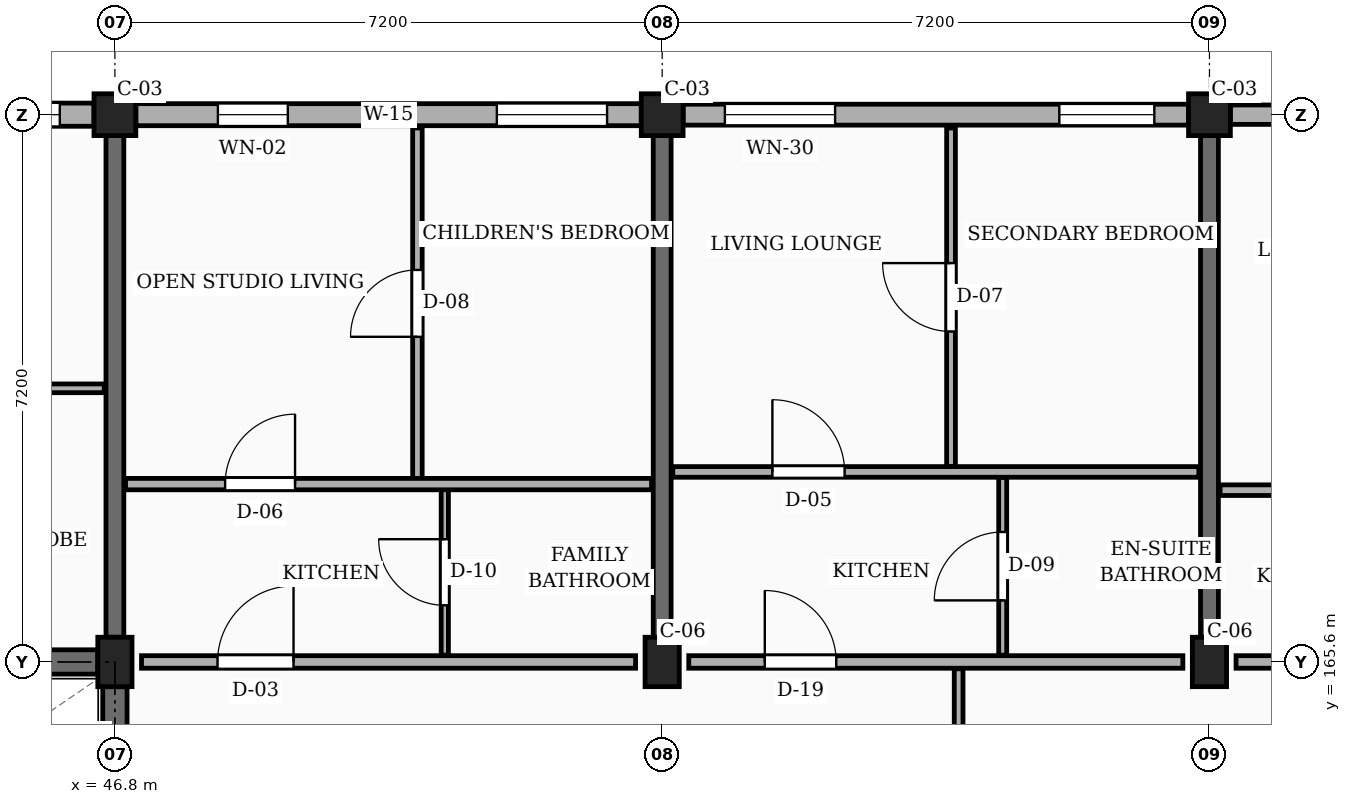
"""IFC4 building model, lengths in metres.
Left out: names, types, materials, properties, quantities, classifications, styles, units other than length and angle.
Written with IfcOpenShell. Run it as: python <this file> out.ifc"""

import sys

from ifc_helpers import new_model, si_unit, direction, frame, frame_2d, origin, origin_2d, place, context, subcontext, project, spatial, rectangle, extrude, element, fill, save


model = new_model("IFC4")
c1 = context("Model", 3, precision=1e-05, world=origin(), true_north=direction((0.0, 1.0)))
c2 = subcontext(c1, "Body", "Model", "MODEL_VIEW")
j1 = project(units=[si_unit("LENGTHUNIT", "METRE"), si_unit("PLANEANGLEUNIT", "RADIAN")], contexts=[c1])
p1 = place(None, origin())
s1 = spatial("IfcSite", under=j1, at=p1, CompositionType="ELEMENT")
p2 = place(p1, origin())
s2 = spatial("IfcBuilding", under=s1, at=p2, CompositionType="ELEMENT")
p3 = place(p2, frame((0.0, 0.0, 17.1)))
s3 = spatial("IfcBuildingStorey", under=s2, at=p3, CompositionType="ELEMENT", Elevation=17.1)
p4 = place(p3, frame((46.8, 165.6, 0.0), z_axis=(0.0, 0.0, 1.0), x_axis=(1.0, 0.0, 0.0)))
e1 = element("IfcColumn", 1, at=p4, inside=s3, PredefinedType="COLUMN", context=c2, shape_type="SweptSolid", body=[
    extrude(rectangle(XDim=0.45, YDim=0.65, at=origin_2d()), origin(), (0.0, 0.0, 1.0), 3.15),
])
p5 = place(p3, frame((46.8, 172.8, 0.0), z_axis=(0.0, 0.0, 1.0), x_axis=(1.0, 0.0, 0.0)))
e2 = element("IfcColumn", 2, at=p5, inside=s3, PredefinedType="COLUMN", context=c2, shape_type="SweptSolid", body=[
    extrude(rectangle(XDim=0.55, YDim=0.55, at=origin_2d()), origin(), (0.0, 0.0, 1.0), 3.15),
])
p6 = place(p3, frame((54.0, 165.6, 0.0), z_axis=(0.0, 0.0, 1.0), x_axis=(1.0, 0.0, 0.0)))
e3 = element("IfcColumn", 3, at=p6, inside=s3, PredefinedType="COLUMN", context=c2, shape_type="SweptSolid", body=[
    extrude(rectangle(XDim=0.45, YDim=0.65, at=origin_2d()), origin(), (0.0, 0.0, 1.0), 3.15),
])
p7 = place(p3, frame((54.0, 172.8, 0.0), z_axis=(0.0, 0.0, 1.0), x_axis=(1.0, 0.0, 0.0)))
e4 = element("IfcColumn", 4, at=p7, inside=s3, PredefinedType="COLUMN", context=c2, shape_type="SweptSolid", body=[
    extrude(rectangle(XDim=0.55, YDim=0.55, at=origin_2d()), origin(), (0.0, 0.0, 1.0), 3.15),
])
p8 = place(p3, frame((61.2, 165.6, 0.0), z_axis=(0.0, 0.0, 1.0), x_axis=(1.0, 0.0, 0.0)))
e5 = element("IfcColumn", 5, at=p8, inside=s3, PredefinedType="COLUMN", context=c2, shape_type="SweptSolid", body=[
    extrude(rectangle(XDim=0.45, YDim=0.65, at=origin_2d()), origin(), (0.0, 0.0, 1.0), 3.15),
])
p9 = place(p3, frame((61.2, 172.8, 0.0), z_axis=(0.0, 0.0, 1.0), x_axis=(1.0, 0.0, 0.0)))
e6 = element("IfcColumn", 6, at=p9, inside=s3, PredefinedType="COLUMN", context=c2, shape_type="SweptSolid", body=[
    extrude(rectangle(XDim=0.55, YDim=0.55, at=origin_2d()), origin(), (0.0, 0.0, 1.0), 3.15),
])
for number, where, z_axis, x_axis in (
    (7, (46.8, 165.925, 0.0), (0.0, 0.0, 1.0), (0.0, 1.0, 0.0)),
    (8, (54.0, 165.925, 0.0), (0.0, 0.0, 1.0), (0.0, 1.0, 0.0)),
    (9, (61.2, 165.925, 0.0), (0.0, 0.0, 1.0), (0.0, 1.0, 0.0)),
):
    element("IfcWall", number, at=place(p3, frame(where, z_axis=z_axis, x_axis=x_axis)), inside=s3, PredefinedType="SOLIDWALL", context=c2, shape_type="SweptSolid", body=[
        extrude(rectangle(XDim=6.6, YDim=0.235, at=frame_2d((3.3, 0.0))), origin(), (0.0, 0.0, 1.0), 2.185),
    ])
p10 = place(p3, frame((68.125, 172.8, 0.0), z_axis=(0.0, 0.0, 1.0), x_axis=(-1.0, 0.0, 0.0)))
e10 = element("IfcWall", 10, at=p10, inside=s3, PredefinedType="SOLIDWALL", context=c2, shape_type="SweptSolid", body=[
    extrude(rectangle(XDim=6.65, YDim=0.255, at=frame_2d((3.325, 0.0))), origin(), (0.0, 0.0, 1.0), 2.455),
])
p11 = place(p10, frame((0.45, 0.0, 0.78)))
e11 = element("IfcOpeningElement", 11, at=p11, cuts=e10, PredefinedType="OPENING", context=c2, shape_type="SweptSolid", body=[
    extrude(rectangle(XDim=1.05, YDim=1.44, at=frame_2d((0.525, 0.72))), frame((0.0, 0.137, 0.0), z_axis=(0.0, -1.0, 0.0), x_axis=(1.0, 0.0, 0.0)), (0.0, 0.0, 1.0), 0.275),
])
p12 = place(p10, frame((4.65, 0.0, 0.78)))
e12 = element("IfcOpeningElement", 12, at=p12, cuts=e10, PredefinedType="OPENING", context=c2, shape_type="SweptSolid", body=[
    extrude(rectangle(XDim=1.25, YDim=1.44, at=frame_2d((0.625, 0.72))), frame((0.0, 0.137, 0.0), z_axis=(0.0, -1.0, 0.0), x_axis=(1.0, 0.0, 0.0)), (0.0, 0.0, 1.0), 0.275),
])
p13 = place(p3, frame((60.925, 172.8, 0.0), z_axis=(0.0, 0.0, 1.0), x_axis=(-1.0, 0.0, 0.0)))
e13 = element("IfcWall", 13, at=p13, inside=s3, PredefinedType="SOLIDWALL", context=c2, shape_type="SweptSolid", body=[
    extrude(rectangle(XDim=6.65, YDim=0.275, at=frame_2d((3.325, 0.0))), origin(), (0.0, 0.0, 1.0), 2.455),
])
p14 = place(p13, frame((0.45, 0.0, 0.78)))
e14 = element("IfcOpeningElement", 14, at=p14, cuts=e13, PredefinedType="OPENING", context=c2, shape_type="SweptSolid", body=[
    extrude(rectangle(XDim=1.25, YDim=1.44, at=frame_2d((0.625, 0.72))), frame((0.0, 0.147, 0.0), z_axis=(0.0, -1.0, 0.0), x_axis=(1.0, 0.0, 0.0)), (0.0, 0.0, 1.0), 0.295),
])
p15 = place(p13, frame((4.65, 0.0, 0.78)))
e15 = element("IfcOpeningElement", 15, at=p15, cuts=e13, PredefinedType="OPENING", context=c2, shape_type="SweptSolid", body=[
    extrude(rectangle(XDim=1.45, YDim=1.44, at=frame_2d((0.725, 0.72))), frame((0.0, 0.147, 0.0), z_axis=(0.0, -1.0, 0.0), x_axis=(1.0, 0.0, 0.0)), (0.0, 0.0, 1.0), 0.295),
])
p16 = place(p3, frame((53.725, 172.8, 0.0), z_axis=(0.0, 0.0, 1.0), x_axis=(-1.0, 0.0, 0.0)))
e16 = element("IfcWall", 16, at=p16, inside=s3, PredefinedType="SOLIDWALL", context=c2, shape_type="SweptSolid", body=[
    extrude(rectangle(XDim=6.65, YDim=0.29, at=frame_2d((3.325, 0.0))), origin(), (0.0, 0.0, 1.0), 2.455),
])
p17 = place(p16, frame((0.45, 0.0, 0.78)))
e17 = element("IfcOpeningElement", 17, at=p17, cuts=e16, PredefinedType="OPENING", context=c2, shape_type="SweptSolid", body=[
    extrude(rectangle(XDim=1.45, YDim=1.44, at=frame_2d((0.725, 0.72))), frame((0.0, 0.155, 0.0), z_axis=(0.0, -1.0, 0.0), x_axis=(1.0, 0.0, 0.0)), (0.0, 0.0, 1.0), 0.31),
])
p18 = place(p16, frame((4.65, 0.0, 0.78)))
e18 = element("IfcOpeningElement", 18, at=p18, cuts=e16, PredefinedType="OPENING", context=c2, shape_type="SweptSolid", body=[
    extrude(rectangle(XDim=0.92, YDim=1.15, at=frame_2d((0.46, 0.575))), frame((0.0, 0.155, 0.0), z_axis=(0.0, -1.0, 0.0), x_axis=(1.0, 0.0, 0.0)), (0.0, 0.0, 1.0), 0.31),
])
p19 = place(p3, frame((46.525, 172.8, 0.0), z_axis=(0.0, 0.0, 1.0), x_axis=(-1.0, 0.0, 0.0)))
e19 = element("IfcWall", 19, at=p19, inside=s3, PredefinedType="SOLIDWALL", context=c2, shape_type="SweptSolid", body=[
    extrude(rectangle(XDim=6.65, YDim=0.305, at=frame_2d((3.325, 0.0))), origin(), (0.0, 0.0, 1.0), 2.455),
])
p20 = place(p19, frame((0.45, 0.0, 0.78)))
e20 = element("IfcOpeningElement", 20, at=p20, cuts=e19, PredefinedType="OPENING", context=c2, shape_type="SweptSolid", body=[
    extrude(rectangle(XDim=0.92, YDim=1.15, at=frame_2d((0.46, 0.575))), frame((0.0, 0.163, 0.0), z_axis=(0.0, -1.0, 0.0), x_axis=(1.0, 0.0, 0.0)), (0.0, 0.0, 1.0), 0.325),
])
p21 = place(p19, frame((4.65, 0.0, 0.78)))
e21 = element("IfcOpeningElement", 21, at=p21, cuts=e19, PredefinedType="OPENING", context=c2, shape_type="SweptSolid", body=[
    extrude(rectangle(XDim=1.08, YDim=1.15, at=frame_2d((0.54, 0.575))), frame((0.0, 0.163, 0.0), z_axis=(0.0, -1.0, 0.0), x_axis=(1.0, 0.0, 0.0)), (0.0, 0.0, 1.0), 0.325),
])
p22 = place(p3, frame((39.825, 165.6, 0.0), z_axis=(0.0, 0.0, 1.0), x_axis=(1.0, 0.0, 0.0)))
e22 = element("IfcWall", 22, at=p22, inside=s3, PredefinedType="SHEAR", context=c2, shape_type="SweptSolid", body=[
    extrude(rectangle(XDim=6.75, YDim=0.32, at=frame_2d((3.375, 0.0))), origin(), (0.0, 0.0, 1.0), 2.885),
])
p23 = place(p3, frame((46.8, 158.725, 0.0), z_axis=(0.0, 0.0, 1.0), x_axis=(0.0, 1.0, 0.0)))
e23 = element("IfcWall", 23, at=p23, inside=s3, PredefinedType="SHEAR", context=c2, shape_type="SweptSolid", body=[
    extrude(rectangle(XDim=6.55, YDim=0.32, at=frame_2d((3.275, 0.0))), origin(), (0.0, 0.0, 1.0), 2.885),
])
p24 = place(p3, frame((47.15, 165.6, 0.0), z_axis=(0.0, 0.0, 1.0), x_axis=(1.0, 0.0, 0.0)))
e24 = element("IfcWall", 24, at=p24, inside=s3, PredefinedType="PARTITIONING", context=c2, shape_type="SweptSolid", body=[
    extrude(rectangle(XDim=6.5, YDim=0.165, at=frame_2d((3.25, 0.0))), origin(), (0.0, 0.0, 1.0), 2.235),
])
p25 = place(p24, frame((1.0, 0.0, 0.0)))
e25 = element("IfcOpeningElement", 25, at=p25, cuts=e24, PredefinedType="OPENING", context=c2, shape_type="SweptSolid", body=[
    extrude(rectangle(XDim=1.0, YDim=2.15, at=frame_2d((0.5, 1.075))), frame((0.0, 0.093, 0.0), z_axis=(0.0, -1.0, 0.0), x_axis=(1.0, 0.0, 0.0)), (0.0, 0.0, 1.0), 0.185),
])
p26 = place(p3, frame((54.35, 165.6, 0.0), z_axis=(0.0, 0.0, 1.0), x_axis=(1.0, 0.0, 0.0)))
e26 = element("IfcWall", 26, at=p26, inside=s3, PredefinedType="PARTITIONING", context=c2, shape_type="SweptSolid", body=[
    extrude(rectangle(XDim=6.5, YDim=0.165, at=frame_2d((3.25, 0.0))), origin(), (0.0, 0.0, 1.0), 2.235),
])
p27 = place(p26, frame((1.0, 0.0, 0.0)))
e27 = element("IfcOpeningElement", 27, at=p27, cuts=e26, PredefinedType="OPENING", context=c2, shape_type="SweptSolid", body=[
    extrude(rectangle(XDim=0.94, YDim=2.12, at=frame_2d((0.47, 1.06))), frame((0.0, 0.093, 0.0), z_axis=(0.0, -1.0, 0.0), x_axis=(1.0, 0.0, 0.0)), (0.0, 0.0, 1.0), 0.185),
])
p28 = place(p3, frame((61.55, 165.6, 0.0), z_axis=(0.0, 0.0, 1.0), x_axis=(1.0, 0.0, 0.0)))
e28 = element("IfcWall", 28, at=p28, inside=s3, PredefinedType="PARTITIONING", context=c2, shape_type="SweptSolid", body=[
    extrude(rectangle(XDim=6.5, YDim=0.165, at=frame_2d((3.25, 0.0))), origin(), (0.0, 0.0, 1.0), 2.235),
])
p29 = place(p28, frame((1.0, 0.0, 0.0)))
e29 = element("IfcOpeningElement", 29, at=p29, cuts=e28, PredefinedType="OPENING", context=c2, shape_type="SweptSolid", body=[
    extrude(rectangle(XDim=1.14, YDim=2.18, at=frame_2d((0.57, 1.09))), frame((0.0, 0.093, 0.0), z_axis=(0.0, -1.0, 0.0), x_axis=(1.0, 0.0, 0.0)), (0.0, 0.0, 1.0), 0.185),
])
p30 = place(p3, frame((39.74, 169.2, 0.0), z_axis=(0.0, 0.0, 1.0), x_axis=(1.0, 0.0, 0.0)))
e30 = element("IfcWall", 30, at=p30, inside=s3, PredefinedType="PARTITIONING", context=c2, shape_type="SweptSolid", body=[
    extrude(rectangle(XDim=6.92, YDim=0.115, at=frame_2d((3.46, 0.0))), origin(), (0.0, 0.0, 1.0), 2.32),
])
p31 = place(p30, frame((1.05, 0.0, 0.0)))
e31 = element("IfcOpeningElement", 31, at=p31, cuts=e30, PredefinedType="OPENING", context=c2, shape_type="SweptSolid", body=[
    extrude(rectangle(XDim=0.87, YDim=2.05, at=frame_2d((0.435, 1.025))), frame((0.0, 0.067, 0.0), z_axis=(0.0, -1.0, 0.0), x_axis=(1.0, 0.0, 0.0)), (0.0, 0.0, 1.0), 0.135),
])
p32 = place(p30, frame((4.45, 0.0, 0.0)))
e32 = element("IfcOpeningElement", 32, at=p32, cuts=e30, PredefinedType="OPENING", context=c2, shape_type="SweptSolid", body=[
    extrude(rectangle(XDim=0.88, YDim=2.08, at=frame_2d((0.44, 1.04))), frame((0.0, 0.067, 0.0), z_axis=(0.0, -1.0, 0.0), x_axis=(1.0, 0.0, 0.0)), (0.0, 0.0, 1.0), 0.135),
])
p33 = place(p3, frame((50.78, 168.01, 0.0), z_axis=(0.0, 0.0, 1.0), x_axis=(0.0, 1.0, 0.0)))
e33 = element("IfcWall", 33, at=p33, inside=s3, PredefinedType="PARTITIONING", context=c2, shape_type="SweptSolid", body=[
    extrude(rectangle(XDim=4.615, YDim=0.125, at=frame_2d((2.308, 0.0))), origin(), (0.0, 0.0, 1.0), 2.32),
])
p34 = place(p33, frame((1.867, 0.0, 0.0)))
e34 = element("IfcOpeningElement", 34, at=p34, cuts=e33, PredefinedType="OPENING", context=c2, shape_type="SweptSolid", body=[
    extrude(rectangle(XDim=0.88, YDim=2.08, at=frame_2d((0.44, 1.04))), frame((0.0, 0.073, 0.0), z_axis=(0.0, -1.0, 0.0), x_axis=(1.0, 0.0, 0.0)), (0.0, 0.0, 1.0), 0.145),
])
p35 = place(p3, frame((51.14, 165.69, 0.0), z_axis=(0.0, 0.0, 1.0), x_axis=(0.0, 1.0, 0.0)))
e35 = element("IfcWall", 35, at=p35, inside=s3, PredefinedType="PARTITIONING", context=c2, shape_type="SweptSolid", body=[
    extrude(rectangle(XDim=2.18, YDim=0.095, at=frame_2d((1.09, 0.0))), origin(), (0.0, 0.0, 1.0), 2.32),
])
p36 = place(p35, frame((0.655, 0.0, 0.0)))
e36 = element("IfcOpeningElement", 36, at=p36, cuts=e35, PredefinedType="OPENING", context=c2, shape_type="SweptSolid", body=[
    extrude(rectangle(XDim=0.87, YDim=2.05, at=frame_2d((0.435, 1.025))), frame((0.0, 0.058, 0.0), z_axis=(0.0, -1.0, 0.0), x_axis=(1.0, 0.0, 0.0)), (0.0, 0.0, 1.0), 0.115),
])
p37 = place(p3, frame((46.94, 167.94, 0.0), z_axis=(0.0, 0.0, 1.0), x_axis=(1.0, 0.0, 0.0)))
e37 = element("IfcWall", 37, at=p37, inside=s3, PredefinedType="PARTITIONING", context=c2, shape_type="SweptSolid", body=[
    extrude(rectangle(XDim=6.92, YDim=0.15, at=frame_2d((3.46, 0.0))), origin(), (0.0, 0.0, 1.0), 2.32),
])
p38 = place(p37, frame((1.31, 0.0, 0.0)))
e38 = element("IfcOpeningElement", 38, at=p38, cuts=e37, PredefinedType="OPENING", context=c2, shape_type="SweptSolid", body=[
    extrude(rectangle(XDim=0.92, YDim=2.1, at=frame_2d((0.46, 1.05))), frame((0.0, 0.085, 0.0), z_axis=(0.0, -1.0, 0.0), x_axis=(1.0, 0.0, 0.0)), (0.0, 0.0, 1.0), 0.17),
])
p39 = place(p3, frame((57.9, 158.49, 0.0), z_axis=(0.0, 0.0, 1.0), x_axis=(0.0, 1.0, 0.0)))
e39 = element("IfcWall", 39, at=p39, inside=s3, PredefinedType="PARTITIONING", context=c2, shape_type="SweptSolid", body=[
    extrude(rectangle(XDim=7.02, YDim=0.115, at=frame_2d((3.51, 0.0))), origin(), (0.0, 0.0, 1.0), 2.32),
])
p40 = place(p39, frame((2.85, 0.0, 0.0)))
e40 = element("IfcOpeningElement", 40, at=p40, cuts=e39, PredefinedType="OPENING", context=c2, shape_type="SweptSolid", body=[
    extrude(rectangle(XDim=1.02, YDim=2.15, at=frame_2d((0.51, 1.075))), frame((0.0, 0.067, 0.0), z_axis=(0.0, -1.0, 0.0), x_axis=(1.0, 0.0, 0.0)), (0.0, 0.0, 1.0), 0.135),
])
p41 = place(p3, frame((57.8, 168.17, 0.0), z_axis=(0.0, 0.0, 1.0), x_axis=(0.0, 1.0, 0.0)))
e41 = element("IfcWall", 41, at=p41, inside=s3, PredefinedType="PARTITIONING", context=c2, shape_type="SweptSolid", body=[
    extrude(rectangle(XDim=4.455, YDim=0.115, at=frame_2d((2.228, 0.0))), origin(), (0.0, 0.0, 1.0), 2.32),
])
p42 = place(p41, frame((1.778, 0.0, 0.0)))
e42 = element("IfcOpeningElement", 42, at=p42, cuts=e41, PredefinedType="OPENING", context=c2, shape_type="SweptSolid", body=[
    extrude(rectangle(XDim=0.9, YDim=2.1, at=frame_2d((0.45, 1.05))), frame((0.0, 0.067, 0.0), z_axis=(0.0, -1.0, 0.0), x_axis=(1.0, 0.0, 0.0)), (0.0, 0.0, 1.0), 0.135),
])
p43 = place(p3, frame((58.48, 165.69, 0.0), z_axis=(0.0, 0.0, 1.0), x_axis=(0.0, 1.0, 0.0)))
e43 = element("IfcWall", 43, at=p43, inside=s3, PredefinedType="PARTITIONING", context=c2, shape_type="SweptSolid", body=[
    extrude(rectangle(XDim=2.34, YDim=0.105, at=frame_2d((1.17, 0.0))), origin(), (0.0, 0.0, 1.0), 2.32),
])
p44 = place(p43, frame((0.72, 0.0, 0.0)))
e44 = element("IfcOpeningElement", 44, at=p44, cuts=e43, PredefinedType="OPENING", context=c2, shape_type="SweptSolid", body=[
    extrude(rectangle(XDim=0.9, YDim=2.05, at=frame_2d((0.45, 1.025))), frame((0.0, 0.062, 0.0), z_axis=(0.0, -1.0, 0.0), x_axis=(1.0, 0.0, 0.0)), (0.0, 0.0, 1.0), 0.125),
])
p45 = place(p3, frame((54.14, 168.1, 0.0), z_axis=(0.0, 0.0, 1.0), x_axis=(1.0, 0.0, 0.0)))
e45 = element("IfcWall", 45, at=p45, inside=s3, PredefinedType="PARTITIONING", context=c2, shape_type="SweptSolid", body=[
    extrude(rectangle(XDim=6.92, YDim=0.14, at=frame_2d((3.46, 0.0))), origin(), (0.0, 0.0, 1.0), 2.32),
])
p46 = place(p45, frame((1.31, 0.0, 0.0)))
e46 = element("IfcOpeningElement", 46, at=p46, cuts=e45, PredefinedType="OPENING", context=c2, shape_type="SweptSolid", body=[
    extrude(rectangle(XDim=0.95, YDim=2.1, at=frame_2d((0.475, 1.05))), frame((0.0, 0.08, 0.0), z_axis=(0.0, -1.0, 0.0), x_axis=(1.0, 0.0, 0.0)), (0.0, 0.0, 1.0), 0.16),
])
p47 = place(p3, frame((61.34, 167.86, 0.0), z_axis=(0.0, 0.0, 1.0), x_axis=(1.0, 0.0, 0.0)))
e47 = element("IfcWall", 47, at=p47, inside=s3, PredefinedType="PARTITIONING", context=c2, shape_type="SweptSolid", body=[
    extrude(rectangle(XDim=6.92, YDim=0.14, at=frame_2d((3.46, 0.0))), origin(), (0.0, 0.0, 1.0), 2.32),
])
p48 = place(p47, frame((1.31, 0.0, 0.0)))
e48 = element("IfcOpeningElement", 48, at=p48, cuts=e47, PredefinedType="OPENING", context=c2, shape_type="SweptSolid", body=[
    extrude(rectangle(XDim=0.95, YDim=2.1, at=frame_2d((0.475, 1.05))), frame((0.0, 0.08, 0.0), z_axis=(0.0, -1.0, 0.0), x_axis=(1.0, 0.0, 0.0)), (0.0, 0.0, 1.0), 0.16),
])
p49 = place(p14, origin())
e49 = element("IfcWindow", 49, at=p49, inside=s3, PartitioningType="SINGLE_PANEL", PredefinedType="WINDOW", context=c2, shape_type="SweptSolid", body=[
    extrude(rectangle(XDim=1.25, YDim=1.44, at=frame_2d((0.625, 0.72))), frame((0.0, 0.03, 0.0), z_axis=(0.0, -1.0, 0.0), x_axis=(1.0, 0.0, 0.0)), (0.0, 0.0, 1.0), 0.06),
])
fill(e14, e49)
p50 = place(p15, origin())
e50 = element("IfcWindow", 50, at=p50, inside=s3, PartitioningType="SINGLE_PANEL", PredefinedType="WINDOW", context=c2, shape_type="SweptSolid", body=[
    extrude(rectangle(XDim=1.45, YDim=1.44, at=frame_2d((0.725, 0.72))), frame((0.0, 0.03, 0.0), z_axis=(0.0, -1.0, 0.0), x_axis=(1.0, 0.0, 0.0)), (0.0, 0.0, 1.0), 0.06),
])
fill(e15, e50)
p51 = place(p17, origin())
e51 = element("IfcWindow", 51, at=p51, inside=s3, PartitioningType="SINGLE_PANEL", PredefinedType="WINDOW", context=c2, shape_type="SweptSolid", body=[
    extrude(rectangle(XDim=1.45, YDim=1.44, at=frame_2d((0.725, 0.72))), frame((0.0, 0.03, 0.0), z_axis=(0.0, -1.0, 0.0), x_axis=(1.0, 0.0, 0.0)), (0.0, 0.0, 1.0), 0.06),
])
fill(e17, e51)
p52 = place(p18, origin())
e52 = element("IfcWindow", 52, at=p52, inside=s3, PartitioningType="SINGLE_PANEL", PredefinedType="WINDOW", context=c2, shape_type="SweptSolid", body=[
    extrude(rectangle(XDim=0.92, YDim=1.15, at=frame_2d((0.46, 0.575))), frame((0.0, 0.03, 0.0), z_axis=(0.0, -1.0, 0.0), x_axis=(1.0, 0.0, 0.0)), (0.0, 0.0, 1.0), 0.06),
])
fill(e18, e52)
p53 = place(p20, origin())
e53 = element("IfcWindow", 53, at=p53, inside=s3, PartitioningType="SINGLE_PANEL", PredefinedType="WINDOW", context=c2, shape_type="SweptSolid", body=[
    extrude(rectangle(XDim=0.92, YDim=1.15, at=frame_2d((0.46, 0.575))), frame((0.0, 0.03, 0.0), z_axis=(0.0, -1.0, 0.0), x_axis=(1.0, 0.0, 0.0)), (0.0, 0.0, 1.0), 0.06),
])
fill(e20, e53)
p54 = place(p25, origin())
e54 = element("IfcDoor", 54, at=p54, inside=s3, OperationType="SINGLE_SWING_RIGHT", PredefinedType="DOOR", context=c2, shape_type="SweptSolid", body=[
    extrude(rectangle(XDim=1.0, YDim=2.15, at=frame_2d((0.5, 1.075))), frame((0.0, 0.025, 0.0), z_axis=(0.0, -1.0, 0.0), x_axis=(1.0, 0.0, 0.0)), (0.0, 0.0, 1.0), 0.05),
])
fill(e25, e54)
p55 = place(p27, origin())
e55 = element("IfcDoor", 55, at=p55, inside=s3, OperationType="SINGLE_SWING_LEFT", PredefinedType="DOOR", context=c2, shape_type="SweptSolid", body=[
    extrude(rectangle(XDim=0.94, YDim=2.12, at=frame_2d((0.47, 1.06))), frame((0.0, 0.025, 0.0), z_axis=(0.0, -1.0, 0.0), x_axis=(1.0, 0.0, 0.0)), (0.0, 0.0, 1.0), 0.05),
])
fill(e27, e55)
p56 = place(p34, origin())
e56 = element("IfcDoor", 56, at=p56, inside=s3, OperationType="SINGLE_SWING_LEFT", PredefinedType="DOOR", context=c2, shape_type="SweptSolid", body=[
    extrude(rectangle(XDim=0.88, YDim=2.08, at=frame_2d((0.44, 1.04))), frame((0.0, 0.025, 0.0), z_axis=(0.0, -1.0, 0.0), x_axis=(1.0, 0.0, 0.0)), (0.0, 0.0, 1.0), 0.05),
])
fill(e34, e56)
p57 = place(p36, origin())
e57 = element("IfcDoor", 57, at=p57, inside=s3, OperationType="SINGLE_SWING_RIGHT", PredefinedType="DOOR", context=c2, shape_type="SweptSolid", body=[
    extrude(rectangle(XDim=0.87, YDim=2.05, at=frame_2d((0.435, 1.025))), frame((0.0, 0.025, 0.0), z_axis=(0.0, -1.0, 0.0), x_axis=(1.0, 0.0, 0.0)), (0.0, 0.0, 1.0), 0.05),
])
fill(e36, e57)
p58 = place(p38, origin())
e58 = element("IfcDoor", 58, at=p58, inside=s3, OperationType="SINGLE_SWING_RIGHT", PredefinedType="DOOR", context=c2, shape_type="SweptSolid", body=[
    extrude(rectangle(XDim=0.92, YDim=2.1, at=frame_2d((0.46, 1.05))), frame((0.0, 0.025, 0.0), z_axis=(0.0, -1.0, 0.0), x_axis=(1.0, 0.0, 0.0)), (0.0, 0.0, 1.0), 0.05),
])
fill(e38, e58)
p59 = place(p42, origin())
e59 = element("IfcDoor", 59, at=p59, inside=s3, OperationType="SINGLE_SWING_RIGHT", PredefinedType="DOOR", context=c2, shape_type="SweptSolid", body=[
    extrude(rectangle(XDim=0.9, YDim=2.1, at=frame_2d((0.45, 1.05))), frame((0.0, 0.025, 0.0), z_axis=(0.0, -1.0, 0.0), x_axis=(1.0, 0.0, 0.0)), (0.0, 0.0, 1.0), 0.05),
])
fill(e42, e59)
p60 = place(p44, origin())
e60 = element("IfcDoor", 60, at=p60, inside=s3, OperationType="SINGLE_SWING_LEFT", PredefinedType="DOOR", context=c2, shape_type="SweptSolid", body=[
    extrude(rectangle(XDim=0.9, YDim=2.05, at=frame_2d((0.45, 1.025))), frame((0.0, 0.025, 0.0), z_axis=(0.0, -1.0, 0.0), x_axis=(1.0, 0.0, 0.0)), (0.0, 0.0, 1.0), 0.05),
])
fill(e44, e60)
p61 = place(p46, origin())
e61 = element("IfcDoor", 61, at=p61, inside=s3, OperationType="SINGLE_SWING_LEFT", PredefinedType="DOOR", context=c2, shape_type="SweptSolid", body=[
    extrude(rectangle(XDim=0.95, YDim=2.1, at=frame_2d((0.475, 1.05))), frame((0.0, 0.025, 0.0), z_axis=(0.0, -1.0, 0.0), x_axis=(1.0, 0.0, 0.0)), (0.0, 0.0, 1.0), 0.05),
])
fill(e46, e61)
save(model, sys.argv[1])
